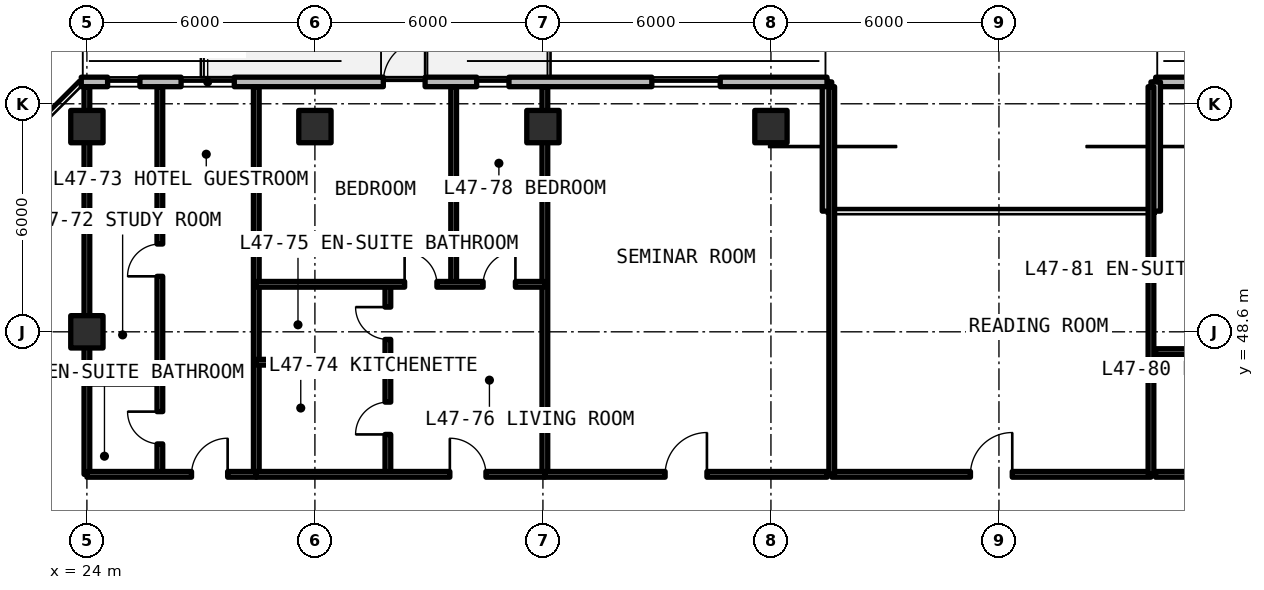
"""IFC4 building model, lengths in metres.
Left out: names, types, materials, properties, quantities, classifications, styles, units other than length and angle.
Written with IfcOpenShell. Run it as: python <this file> out.ifc"""

import sys

from ifc_helpers import new_model, si_unit, direction, frame, frame_2d, origin, origin_2d, place, context, subcontext, project, spatial, rectangle, extrude, element, fill, save


model = new_model("IFC4")
c1 = context("Model", 3, precision=1e-05, world=origin(), true_north=direction((0.0, 1.0)))
c2 = subcontext(c1, "Body", "Model", "MODEL_VIEW")
j1 = project(units=[si_unit("LENGTHUNIT", "METRE"), si_unit("PLANEANGLEUNIT", "RADIAN")], contexts=[c1])
p1 = place(None, origin())
s1 = spatial("IfcSite", under=j1, at=p1, CompositionType="ELEMENT")
p2 = place(p1, origin())
s2 = spatial("IfcBuilding", under=s1, at=p2, CompositionType="ELEMENT")
p3 = place(p2, frame((0.0, 0.0, 169.29)))
s3 = spatial("IfcBuildingStorey", under=s2, at=p3, CompositionType="ELEMENT", Elevation=169.29)
for number, where, z_axis, x_axis in (
    (1, (24.0, 48.6, 0.0), (0.0, 0.0, 1.0), (1.0, 0.0, 0.0)),
    (2, (24.0, 54.0, 0.0), (0.0, 0.0, 1.0), (1.0, 0.0, 0.0)),
    (3, (30.0, 54.0, 0.0), (0.0, 0.0, 1.0), (1.0, 0.0, 0.0)),
    (4, (36.0, 54.0, 0.0), (0.0, 0.0, 1.0), (1.0, 0.0, 0.0)),
    (5, (42.0, 54.0, 0.0), (0.0, 0.0, 1.0), (1.0, 0.0, 0.0)),
):
    element("IfcColumn", number, at=place(p3, frame(where, z_axis=z_axis, x_axis=x_axis)), inside=s3, PredefinedType="COLUMN", context=c2, shape_type="SweptSolid", body=[
        extrude(rectangle(XDim=0.85, YDim=0.85, at=origin_2d()), origin(), (0.0, 0.0, 1.0), 3.63),
    ])
p4 = place(p3, frame((95.748, 55.175, 0.0), z_axis=(0.0, 0.0, 1.0), x_axis=(-1.0, 0.0, 0.0)))
e6 = element("IfcWall", 6, at=p4, inside=s3, PredefinedType="SOLIDWALL", context=c2, shape_type="SweptSolid", body=[
    extrude(rectangle(XDim=43.623, YDim=0.25, at=frame_2d((21.812, 0.0))), origin(), (0.0, 0.0, 1.0), 3.35),
])
p5 = place(p4, frame((26.798, 0.0, 0.0)))
e7 = element("IfcOpeningElement", 7, at=p5, cuts=e6, PredefinedType="OPENING", context=c2, shape_type="SweptSolid", body=[
    extrude(rectangle(XDim=1.1, YDim=2.15, at=frame_2d((0.55, 1.075))), frame((0.0, 0.135, 0.0), z_axis=(0.0, -1.0, 0.0), x_axis=(1.0, 0.0, 0.0)), (0.0, 0.0, 1.0), 0.27),
])
p6 = place(p4, frame((19.448, 0.0, 0.0)))
e8 = element("IfcOpeningElement", 8, at=p6, cuts=e6, PredefinedType="OPENING", context=c2, shape_type="SweptSolid", body=[
    extrude(rectangle(XDim=1.1, YDim=2.15, at=frame_2d((0.55, 1.075))), frame((0.0, 0.135, 0.0), z_axis=(0.0, -1.0, 0.0), x_axis=(1.0, 0.0, 0.0)), (0.0, 0.0, 1.0), 0.27),
])
p7 = place(p4, frame((39.117, 0.0, 0.78)))
e9 = element("IfcOpeningElement", 9, at=p7, cuts=e6, PredefinedType="OPENING", context=c2, shape_type="SweptSolid", body=[
    extrude(rectangle(XDim=1.8, YDim=1.66, at=frame_2d((0.9, 0.83))), frame((0.0, 0.135, 0.0), z_axis=(0.0, -1.0, 0.0), x_axis=(1.0, 0.0, 0.0)), (0.0, 0.0, 1.0), 0.27),
])
p8 = place(p4, frame((33.135, 0.0, 0.78)))
e10 = element("IfcOpeningElement", 10, at=p8, cuts=e6, PredefinedType="OPENING", context=c2, shape_type="SweptSolid", body=[
    extrude(rectangle(XDim=1.8, YDim=1.66, at=frame_2d((0.9, 0.83))), frame((0.0, 0.135, 0.0), z_axis=(0.0, -1.0, 0.0), x_axis=(1.0, 0.0, 0.0)), (0.0, 0.0, 1.0), 0.27),
])
p9 = place(p4, frame((12.563, 0.0, 0.78)))
e11 = element("IfcOpeningElement", 11, at=p9, cuts=e6, PredefinedType="OPENING", context=c2, shape_type="SweptSolid", body=[
    extrude(rectangle(XDim=1.8, YDim=1.66, at=frame_2d((0.9, 0.83))), frame((0.0, 0.135, 0.0), z_axis=(0.0, -1.0, 0.0), x_axis=(1.0, 0.0, 0.0)), (0.0, 0.0, 1.0), 0.27),
])
p10 = place(p4, frame((3.116, 0.0, 0.78)))
e12 = element("IfcOpeningElement", 12, at=p10, cuts=e6, PredefinedType="OPENING", context=c2, shape_type="SweptSolid", body=[
    extrude(rectangle(XDim=1.8, YDim=1.66, at=frame_2d((0.9, 0.83))), frame((0.0, 0.135, 0.0), z_axis=(0.0, -1.0, 0.0), x_axis=(1.0, 0.0, 0.0)), (0.0, 0.0, 1.0), 0.27),
])
for number, where, z_axis, x_axis in (
    (13, (52.125, 55.175, 0.0), (0.0, 0.0, 1.0), (0.0, -1.0, 0.0)),
    (14, (43.475, 51.775, 0.0), (0.0, 0.0, 1.0), (0.0, 1.0, 0.0)),
):
    element("IfcWall", number, at=place(p3, frame(where, z_axis=z_axis, x_axis=x_axis)), inside=s3, PredefinedType="SOLIDWALL", context=c2, shape_type="SweptSolid", body=[
        extrude(rectangle(XDim=3.4, YDim=0.25, at=frame_2d((1.7, 0.0))), origin(), (0.0, 0.0, 1.0), 3.35),
    ])
p11 = place(p3, frame((43.475, 55.175, 0.0), z_axis=(0.0, 0.0, 1.0), x_axis=(-1.0, 0.0, 0.0)))
e15 = element("IfcWall", 15, at=p11, inside=s3, PredefinedType="SOLIDWALL", context=c2, shape_type="SweptSolid", body=[
    extrude(rectangle(XDim=19.623, YDim=0.25, at=frame_2d((9.812, 0.0))), origin(), (0.0, 0.0, 1.0), 3.35),
])
p12 = place(p11, frame((10.575, 0.0, 0.0)))
e16 = element("IfcOpeningElement", 16, at=p12, cuts=e15, PredefinedType="OPENING", context=c2, shape_type="SweptSolid", body=[
    extrude(rectangle(XDim=1.1, YDim=2.15, at=frame_2d((0.55, 1.075))), frame((0.0, 0.135, 0.0), z_axis=(0.0, -1.0, 0.0), x_axis=(1.0, 0.0, 0.0)), (0.0, 0.0, 1.0), 0.27),
])
p13 = place(p11, frame((18.08, 0.0, 0.78)))
e17 = element("IfcOpeningElement", 17, at=p13, cuts=e15, PredefinedType="OPENING", context=c2, shape_type="SweptSolid", body=[
    extrude(rectangle(XDim=0.85, YDim=1.65, at=frame_2d((0.425, 0.825))), frame((0.0, 0.135, 0.0), z_axis=(0.0, -1.0, 0.0), x_axis=(1.0, 0.0, 0.0)), (0.0, 0.0, 1.0), 0.27),
])
p14 = place(p11, frame((15.596, 0.0, 0.78)))
e18 = element("IfcOpeningElement", 18, at=p14, cuts=e15, PredefinedType="OPENING", context=c2, shape_type="SweptSolid", body=[
    extrude(rectangle(XDim=1.4, YDim=1.65, at=frame_2d((0.7, 0.825))), frame((0.0, 0.135, 0.0), z_axis=(0.0, -1.0, 0.0), x_axis=(1.0, 0.0, 0.0)), (0.0, 0.0, 1.0), 0.27),
])
p15 = place(p11, frame((8.369, 0.0, 0.78)))
e19 = element("IfcOpeningElement", 19, at=p15, cuts=e15, PredefinedType="OPENING", context=c2, shape_type="SweptSolid", body=[
    extrude(rectangle(XDim=0.85, YDim=1.65, at=frame_2d((0.425, 0.825))), frame((0.0, 0.135, 0.0), z_axis=(0.0, -1.0, 0.0), x_axis=(1.0, 0.0, 0.0)), (0.0, 0.0, 1.0), 0.27),
])
p16 = place(p11, frame((2.809, 0.0, 0.78)))
e20 = element("IfcOpeningElement", 20, at=p16, cuts=e15, PredefinedType="OPENING", context=c2, shape_type="SweptSolid", body=[
    extrude(rectangle(XDim=1.8, YDim=1.66, at=frame_2d((0.9, 0.83))), frame((0.0, 0.135, 0.0), z_axis=(0.0, -1.0, 0.0), x_axis=(1.0, 0.0, 0.0)), (0.0, 0.0, 1.0), 0.27),
])
p17 = place(p3, frame((43.6, 44.85, 0.0), z_axis=(0.0, 0.0, 1.0), x_axis=(1.0, 0.0, 0.0)))
e21 = element("IfcWall", 21, at=p17, inside=s3, PredefinedType="SOLIDWALL", context=c2, shape_type="SweptSolid", body=[
    extrude(rectangle(XDim=8.4, YDim=0.15, at=frame_2d((4.2, 0.0))), origin(), (0.0, 0.0, 1.0), 2.57),
])
p18 = place(p17, frame((3.65, 0.0, 0.0)))
e22 = element("IfcOpeningElement", 22, at=p18, cuts=e21, PredefinedType="OPENING", context=c2, shape_type="SweptSolid", body=[
    extrude(rectangle(XDim=1.1, YDim=2.15, at=frame_2d((0.55, 1.075))), frame((0.0, 0.085, 0.0), z_axis=(0.0, -1.0, 0.0), x_axis=(1.0, 0.0, 0.0)), (0.0, 0.0, 1.0), 0.17),
])
for number, where, z_axis, x_axis in (
    (23, (43.6, 44.85, 0.0), (0.0, 0.0, 1.0), (0.0, 1.0, 0.0)),
    (24, (52.0, 44.85, 0.0), (0.0, 0.0, 1.0), (0.0, 1.0, 0.0)),
    (25, (24.0, 44.85, 0.0), (0.0, 0.0, 1.0), (0.0, 1.0, 0.0)),
    (26, (28.457, 44.85, 0.0), (0.0, 0.0, 1.0), (0.0, 1.0, 0.0)),
):
    element("IfcWall", number, at=place(p3, frame(where, z_axis=z_axis, x_axis=x_axis)), inside=s3, PredefinedType="SOLIDWALL", context=c2, shape_type="SweptSolid", body=[
        extrude(rectangle(XDim=10.2, YDim=0.15, at=frame_2d((5.1, 0.0))), origin(), (0.0, 0.0, 1.0), 2.57),
    ])
p19 = place(p3, frame((24.0, 47.3, 0.0), z_axis=(0.0, 0.0, 1.0), x_axis=(1.0, 0.0, 0.0)))
e27 = element("IfcWall", 27, at=p19, inside=s3, PredefinedType="PARTITIONING", context=c2, shape_type="SweptSolid", body=[
    extrude(rectangle(XDim=1.92, YDim=0.15, at=frame_2d((0.96, 0.0))), origin(), (0.0, 0.0, 1.0), 2.57),
])
p20 = place(p3, frame((25.92, 44.85, 0.0), z_axis=(0.0, 0.0, 1.0), x_axis=(0.0, 1.0, 0.0)))
e28 = element("IfcWall", 28, at=p20, inside=s3, PredefinedType="PARTITIONING", context=c2, shape_type="SweptSolid", body=[
    extrude(rectangle(XDim=10.2, YDim=0.15, at=frame_2d((5.1, 0.0))), origin(), (0.0, 0.0, 1.0), 2.57),
])
p21 = place(p20, frame((0.8, 0.0, 0.0)))
e29 = element("IfcOpeningElement", 29, at=p21, cuts=e28, PredefinedType="OPENING", context=c2, shape_type="SweptSolid", body=[
    extrude(rectangle(XDim=0.85, YDim=2.1, at=frame_2d((0.425, 1.05))), frame((0.0, 0.085, 0.0), z_axis=(0.0, -1.0, 0.0), x_axis=(1.0, 0.0, 0.0)), (0.0, 0.0, 1.0), 0.17),
])
p22 = place(p20, frame((5.21, 0.0, 0.0)))
e30 = element("IfcOpeningElement", 30, at=p22, cuts=e28, PredefinedType="OPENING", context=c2, shape_type="SweptSolid", body=[
    extrude(rectangle(XDim=0.85, YDim=2.1, at=frame_2d((0.425, 1.05))), frame((0.0, 0.085, 0.0), z_axis=(0.0, -1.0, 0.0), x_axis=(1.0, 0.0, 0.0)), (0.0, 0.0, 1.0), 0.17),
])
p23 = place(p3, frame((24.0, 44.85, 0.0), z_axis=(0.0, 0.0, 1.0), x_axis=(1.0, 0.0, 0.0)))
e31 = element("IfcWall", 31, at=p23, inside=s3, PredefinedType="SOLIDWALL", context=c2, shape_type="SweptSolid", body=[
    extrude(rectangle(XDim=4.457, YDim=0.15, at=frame_2d((2.229, 0.0))), origin(), (0.0, 0.0, 1.0), 2.57),
])
p24 = place(p23, frame((2.754, 0.0, 0.0)))
e32 = element("IfcOpeningElement", 32, at=p24, cuts=e31, PredefinedType="OPENING", context=c2, shape_type="SweptSolid", body=[
    extrude(rectangle(XDim=0.95, YDim=2.15, at=frame_2d((0.475, 1.075))), frame((0.0, 0.085, 0.0), z_axis=(0.0, -1.0, 0.0), x_axis=(1.0, 0.0, 0.0)), (0.0, 0.0, 1.0), 0.17),
])
p25 = place(p3, frame((36.051, 44.85, 0.0), z_axis=(0.0, 0.0, 1.0), x_axis=(0.0, 1.0, 0.0)))
e33 = element("IfcWall", 33, at=p25, inside=s3, PredefinedType="SOLIDWALL", context=c2, shape_type="SweptSolid", body=[
    extrude(rectangle(XDim=10.2, YDim=0.15, at=frame_2d((5.1, 0.0))), origin(), (0.0, 0.0, 1.0), 2.57),
])
p26 = place(p3, frame((28.457, 47.8, 0.0), z_axis=(0.0, 0.0, 1.0), x_axis=(1.0, 0.0, 0.0)))
e34 = element("IfcWall", 34, at=p26, inside=s3, PredefinedType="PARTITIONING", context=c2, shape_type="SweptSolid", body=[
    extrude(rectangle(XDim=3.463, YDim=0.15, at=frame_2d((1.731, 0.0))), origin(), (0.0, 0.0, 1.0), 2.57),
])
p27 = place(p3, frame((31.92, 44.85, 0.0), z_axis=(0.0, 0.0, 1.0), x_axis=(0.0, 1.0, 0.0)))
e35 = element("IfcWall", 35, at=p27, inside=s3, PredefinedType="PARTITIONING", context=c2, shape_type="SweptSolid", body=[
    extrude(rectangle(XDim=5.0, YDim=0.15, at=frame_2d((2.5, 0.0))), origin(), (0.0, 0.0, 1.0), 2.57),
])
p28 = place(p27, frame((1.05, 0.0, 0.0)))
e36 = element("IfcOpeningElement", 36, at=p28, cuts=e35, PredefinedType="OPENING", context=c2, shape_type="SweptSolid", body=[
    extrude(rectangle(XDim=0.85, YDim=2.1, at=frame_2d((0.425, 1.05))), frame((0.0, 0.085, 0.0), z_axis=(0.0, -1.0, 0.0), x_axis=(1.0, 0.0, 0.0)), (0.0, 0.0, 1.0), 0.17),
])
p29 = place(p27, frame((3.55, 0.0, 0.0)))
e37 = element("IfcOpeningElement", 37, at=p29, cuts=e35, PredefinedType="OPENING", context=c2, shape_type="SweptSolid", body=[
    extrude(rectangle(XDim=0.85, YDim=2.1, at=frame_2d((0.425, 1.05))), frame((0.0, 0.085, 0.0), z_axis=(0.0, -1.0, 0.0), x_axis=(1.0, 0.0, 0.0)), (0.0, 0.0, 1.0), 0.17),
])
p30 = place(p3, frame((33.651, 49.85, 0.0), z_axis=(0.0, 0.0, 1.0), x_axis=(0.0, 1.0, 0.0)))
e38 = element("IfcWall", 38, at=p30, inside=s3, PredefinedType="PARTITIONING", context=c2, shape_type="SweptSolid", body=[
    extrude(rectangle(XDim=5.2, YDim=0.15, at=frame_2d((2.6, 0.0))), origin(), (0.0, 0.0, 1.0), 2.57),
])
p31 = place(p3, frame((28.457, 49.85, 0.0), z_axis=(0.0, 0.0, 1.0), x_axis=(1.0, 0.0, 0.0)))
e39 = element("IfcWall", 39, at=p31, inside=s3, PredefinedType="PARTITIONING", context=c2, shape_type="SweptSolid", body=[
    extrude(rectangle(XDim=7.594, YDim=0.15, at=frame_2d((3.797, 0.0))), origin(), (0.0, 0.0, 1.0), 2.57),
])
p32 = place(p31, frame((3.903, 0.0, 0.0)))
e40 = element("IfcOpeningElement", 40, at=p32, cuts=e39, PredefinedType="OPENING", context=c2, shape_type="SweptSolid", body=[
    extrude(rectangle(XDim=0.85, YDim=2.1, at=frame_2d((0.425, 1.05))), frame((0.0, 0.085, 0.0), z_axis=(0.0, -1.0, 0.0), x_axis=(1.0, 0.0, 0.0)), (0.0, 0.0, 1.0), 0.17),
])
p33 = place(p31, frame((5.969, 0.0, 0.0)))
e41 = element("IfcOpeningElement", 41, at=p33, cuts=e39, PredefinedType="OPENING", context=c2, shape_type="SweptSolid", body=[
    extrude(rectangle(XDim=0.85, YDim=2.1, at=frame_2d((0.425, 1.05))), frame((0.0, 0.085, 0.0), z_axis=(0.0, -1.0, 0.0), x_axis=(1.0, 0.0, 0.0)), (0.0, 0.0, 1.0), 0.17),
])
p34 = place(p3, frame((28.457, 44.85, 0.0), z_axis=(0.0, 0.0, 1.0), x_axis=(1.0, 0.0, 0.0)))
e42 = element("IfcWall", 42, at=p34, inside=s3, PredefinedType="SOLIDWALL", context=c2, shape_type="SweptSolid", body=[
    extrude(rectangle(XDim=7.594, YDim=0.15, at=frame_2d((3.797, 0.0))), origin(), (0.0, 0.0, 1.0), 2.57),
])
p35 = place(p34, frame((5.093, 0.0, 0.0)))
e43 = element("IfcOpeningElement", 43, at=p35, cuts=e42, PredefinedType="OPENING", context=c2, shape_type="SweptSolid", body=[
    extrude(rectangle(XDim=0.95, YDim=2.15, at=frame_2d((0.475, 1.075))), frame((0.0, 0.085, 0.0), z_axis=(0.0, -1.0, 0.0), x_axis=(1.0, 0.0, 0.0)), (0.0, 0.0, 1.0), 0.17),
])
p36 = place(p3, frame((36.051, 44.85, 0.0), z_axis=(0.0, 0.0, 1.0), x_axis=(1.0, 0.0, 0.0)))
e44 = element("IfcWall", 44, at=p36, inside=s3, PredefinedType="SOLIDWALL", context=c2, shape_type="SweptSolid", body=[
    extrude(rectangle(XDim=7.429, YDim=0.15, at=frame_2d((3.714, 0.0))), origin(), (0.0, 0.0, 1.0), 2.57),
])
p37 = place(p36, frame((3.164, 0.0, 0.0)))
e45 = element("IfcOpeningElement", 45, at=p37, cuts=e44, PredefinedType="OPENING", context=c2, shape_type="SweptSolid", body=[
    extrude(rectangle(XDim=1.1, YDim=2.15, at=frame_2d((0.55, 1.075))), frame((0.0, 0.085, 0.0), z_axis=(0.0, -1.0, 0.0), x_axis=(1.0, 0.0, 0.0)), (0.0, 0.0, 1.0), 0.17),
])
p38 = place(p3, frame((52.12, 48.08, 0.0), z_axis=(0.0, 0.0, 1.0), x_axis=(1.0, 0.0, 0.0)))
e46 = element("IfcWall", 46, at=p38, inside=s3, PredefinedType="PARTITIONING", context=c2, shape_type="SweptSolid", body=[
    extrude(rectangle(XDim=3.8, YDim=0.15, at=frame_2d((1.9, 0.0))), origin(), (0.0, 0.0, 1.0), 2.57),
])
p39 = place(p3, frame((52.12, 50.324, 0.0), z_axis=(0.0, 0.0, 1.0), x_axis=(1.0, 0.0, 0.0)))
e47 = element("IfcWall", 47, at=p39, inside=s3, PredefinedType="PARTITIONING", context=c2, shape_type="SweptSolid", body=[
    extrude(rectangle(XDim=12.004, YDim=0.15, at=frame_2d((6.002, 0.0))), origin(), (0.0, 0.0, 1.0), 2.57),
])
p40 = place(p39, frame((4.596, 0.0, 0.0)))
e48 = element("IfcOpeningElement", 48, at=p40, cuts=e47, PredefinedType="OPENING", context=c2, shape_type="SweptSolid", body=[
    extrude(rectangle(XDim=0.85, YDim=2.1, at=frame_2d((0.425, 1.05))), frame((0.0, 0.085, 0.0), z_axis=(0.0, -1.0, 0.0), x_axis=(1.0, 0.0, 0.0)), (0.0, 0.0, 1.0), 0.17),
])
p41 = place(p39, frame((8.698, 0.0, 0.0)))
e49 = element("IfcOpeningElement", 49, at=p41, cuts=e47, PredefinedType="OPENING", context=c2, shape_type="SweptSolid", body=[
    extrude(rectangle(XDim=0.85, YDim=2.1, at=frame_2d((0.425, 1.05))), frame((0.0, 0.085, 0.0), z_axis=(0.0, -1.0, 0.0), x_axis=(1.0, 0.0, 0.0)), (0.0, 0.0, 1.0), 0.17),
])
p42 = place(p3, frame((52.12, 44.85, 0.0), z_axis=(0.0, 0.0, 1.0), x_axis=(1.0, 0.0, 0.0)))
e50 = element("IfcWall", 50, at=p42, inside=s3, PredefinedType="SOLIDWALL", context=c2, shape_type="SweptSolid", body=[
    extrude(rectangle(XDim=12.004, YDim=0.15, at=frame_2d((6.002, 0.0))), origin(), (0.0, 0.0, 1.0), 2.57),
])
p43 = place(p42, frame((7.467, 0.0, 0.0)))
e51 = element("IfcOpeningElement", 51, at=p43, cuts=e50, PredefinedType="OPENING", context=c2, shape_type="SweptSolid", body=[
    extrude(rectangle(XDim=0.95, YDim=2.15, at=frame_2d((0.475, 1.075))), frame((0.0, 0.085, 0.0), z_axis=(0.0, -1.0, 0.0), x_axis=(1.0, 0.0, 0.0)), (0.0, 0.0, 1.0), 0.17),
])
p44 = place(p12, frame((1.1, 0.0, 0.0), z_axis=(0.0, 0.0, 1.0), x_axis=(-1.0, 0.0, 0.0)))
e52 = element("IfcDoor", 52, at=p44, inside=s3, OperationType="SINGLE_SWING_LEFT", PredefinedType="DOOR", context=c2, shape_type="SweptSolid", body=[
    extrude(rectangle(XDim=1.1, YDim=2.15, at=frame_2d((0.55, 1.075))), frame((0.0, 0.025, 0.0), z_axis=(0.0, -1.0, 0.0), x_axis=(1.0, 0.0, 0.0)), (0.0, 0.0, 1.0), 0.05),
])
fill(e16, e52)
p45 = place(p13, origin())
e53 = element("IfcWindow", 53, at=p45, inside=s3, PartitioningType="SINGLE_PANEL", PredefinedType="WINDOW", context=c2, shape_type="SweptSolid", body=[
    extrude(rectangle(XDim=0.85, YDim=1.65, at=frame_2d((0.425, 0.825))), frame((0.0, 0.03, 0.0), z_axis=(0.0, -1.0, 0.0), x_axis=(1.0, 0.0, 0.0)), (0.0, 0.0, 1.0), 0.06),
])
fill(e17, e53)
p46 = place(p14, origin())
e54 = element("IfcWindow", 54, at=p46, inside=s3, PartitioningType="SINGLE_PANEL", PredefinedType="WINDOW", context=c2, shape_type="SweptSolid", body=[
    extrude(rectangle(XDim=1.4, YDim=1.65, at=frame_2d((0.7, 0.825))), frame((0.0, 0.03, 0.0), z_axis=(0.0, -1.0, 0.0), x_axis=(1.0, 0.0, 0.0)), (0.0, 0.0, 1.0), 0.06),
])
fill(e18, e54)
p47 = place(p15, origin())
e55 = element("IfcWindow", 55, at=p47, inside=s3, PartitioningType="SINGLE_PANEL", PredefinedType="WINDOW", context=c2, shape_type="SweptSolid", body=[
    extrude(rectangle(XDim=0.85, YDim=1.65, at=frame_2d((0.425, 0.825))), frame((0.0, 0.03, 0.0), z_axis=(0.0, -1.0, 0.0), x_axis=(1.0, 0.0, 0.0)), (0.0, 0.0, 1.0), 0.06),
])
fill(e19, e55)
p48 = place(p16, origin())
e56 = element("IfcWindow", 56, at=p48, inside=s3, PartitioningType="SINGLE_PANEL", PredefinedType="WINDOW", context=c2, shape_type="SweptSolid", body=[
    extrude(rectangle(XDim=1.8, YDim=1.66, at=frame_2d((0.9, 0.83))), frame((0.0, 0.03, 0.0), z_axis=(0.0, -1.0, 0.0), x_axis=(1.0, 0.0, 0.0)), (0.0, 0.0, 1.0), 0.06),
])
fill(e20, e56)
p49 = place(p18, origin())
e57 = element("IfcDoor", 57, at=p49, inside=s3, OperationType="SINGLE_SWING_RIGHT", PredefinedType="DOOR", context=c2, shape_type="SweptSolid", body=[
    extrude(rectangle(XDim=1.1, YDim=2.15, at=frame_2d((0.55, 1.075))), frame((0.0, 0.025, 0.0), z_axis=(0.0, -1.0, 0.0), x_axis=(1.0, 0.0, 0.0)), (0.0, 0.0, 1.0), 0.05),
])
fill(e22, e57)
p50 = place(p21, origin())
e58 = element("IfcDoor", 58, at=p50, inside=s3, OperationType="SINGLE_SWING_RIGHT", PredefinedType="DOOR", context=c2, shape_type="SweptSolid", body=[
    extrude(rectangle(XDim=0.85, YDim=2.1, at=frame_2d((0.425, 1.05))), frame((0.0, 0.025, 0.0), z_axis=(0.0, -1.0, 0.0), x_axis=(1.0, 0.0, 0.0)), (0.0, 0.0, 1.0), 0.05),
])
fill(e29, e58)
p51 = place(p22, origin())
e59 = element("IfcDoor", 59, at=p51, inside=s3, OperationType="SINGLE_SWING_LEFT", PredefinedType="DOOR", context=c2, shape_type="SweptSolid", body=[
    extrude(rectangle(XDim=0.85, YDim=2.1, at=frame_2d((0.425, 1.05))), frame((0.0, 0.025, 0.0), z_axis=(0.0, -1.0, 0.0), x_axis=(1.0, 0.0, 0.0)), (0.0, 0.0, 1.0), 0.05),
])
fill(e30, e59)
p52 = place(p24, origin())
e60 = element("IfcDoor", 60, at=p52, inside=s3, OperationType="SINGLE_SWING_RIGHT", PredefinedType="DOOR", context=c2, shape_type="SweptSolid", body=[
    extrude(rectangle(XDim=0.95, YDim=2.15, at=frame_2d((0.475, 1.075))), frame((0.0, 0.025, 0.0), z_axis=(0.0, -1.0, 0.0), x_axis=(1.0, 0.0, 0.0)), (0.0, 0.0, 1.0), 0.05),
])
fill(e32, e60)
p53 = place(p28, origin())
e61 = element("IfcDoor", 61, at=p53, inside=s3, OperationType="SINGLE_SWING_LEFT", PredefinedType="DOOR", context=c2, shape_type="SweptSolid", body=[
    extrude(rectangle(XDim=0.85, YDim=2.1, at=frame_2d((0.425, 1.05))), frame((0.0, 0.025, 0.0), z_axis=(0.0, -1.0, 0.0), x_axis=(1.0, 0.0, 0.0)), (0.0, 0.0, 1.0), 0.05),
])
fill(e36, e61)
p54 = place(p29, origin())
e62 = element("IfcDoor", 62, at=p54, inside=s3, OperationType="SINGLE_SWING_RIGHT", PredefinedType="DOOR", context=c2, shape_type="SweptSolid", body=[
    extrude(rectangle(XDim=0.85, YDim=2.1, at=frame_2d((0.425, 1.05))), frame((0.0, 0.025, 0.0), z_axis=(0.0, -1.0, 0.0), x_axis=(1.0, 0.0, 0.0)), (0.0, 0.0, 1.0), 0.05),
])
fill(e37, e62)
p55 = place(p32, origin())
e63 = element("IfcDoor", 63, at=p55, inside=s3, OperationType="SINGLE_SWING_LEFT", PredefinedType="DOOR", context=c2, shape_type="SweptSolid", body=[
    extrude(rectangle(XDim=0.85, YDim=2.1, at=frame_2d((0.425, 1.05))), frame((0.0, 0.025, 0.0), z_axis=(0.0, -1.0, 0.0), x_axis=(1.0, 0.0, 0.0)), (0.0, 0.0, 1.0), 0.05),
])
fill(e40, e63)
p56 = place(p33, origin())
e64 = element("IfcDoor", 64, at=p56, inside=s3, OperationType="SINGLE_SWING_RIGHT", PredefinedType="DOOR", context=c2, shape_type="SweptSolid", body=[
    extrude(rectangle(XDim=0.85, YDim=2.1, at=frame_2d((0.425, 1.05))), frame((0.0, 0.025, 0.0), z_axis=(0.0, -1.0, 0.0), x_axis=(1.0, 0.0, 0.0)), (0.0, 0.0, 1.0), 0.05),
])
fill(e41, e64)
p57 = place(p35, origin())
e65 = element("IfcDoor", 65, at=p57, inside=s3, OperationType="SINGLE_SWING_LEFT", PredefinedType="DOOR", context=c2, shape_type="SweptSolid", body=[
    extrude(rectangle(XDim=0.95, YDim=2.15, at=frame_2d((0.475, 1.075))), frame((0.0, 0.025, 0.0), z_axis=(0.0, -1.0, 0.0), x_axis=(1.0, 0.0, 0.0)), (0.0, 0.0, 1.0), 0.05),
])
fill(e43, e65)
p58 = place(p37, origin())
e66 = element("IfcDoor", 66, at=p58, inside=s3, OperationType="SINGLE_SWING_RIGHT", PredefinedType="DOOR", context=c2, shape_type="SweptSolid", body=[
    extrude(rectangle(XDim=1.1, YDim=2.15, at=frame_2d((0.55, 1.075))), frame((0.0, 0.025, 0.0), z_axis=(0.0, -1.0, 0.0), x_axis=(1.0, 0.0, 0.0)), (0.0, 0.0, 1.0), 0.05),
])
fill(e45, e66)
save(model, sys.argv[1])
